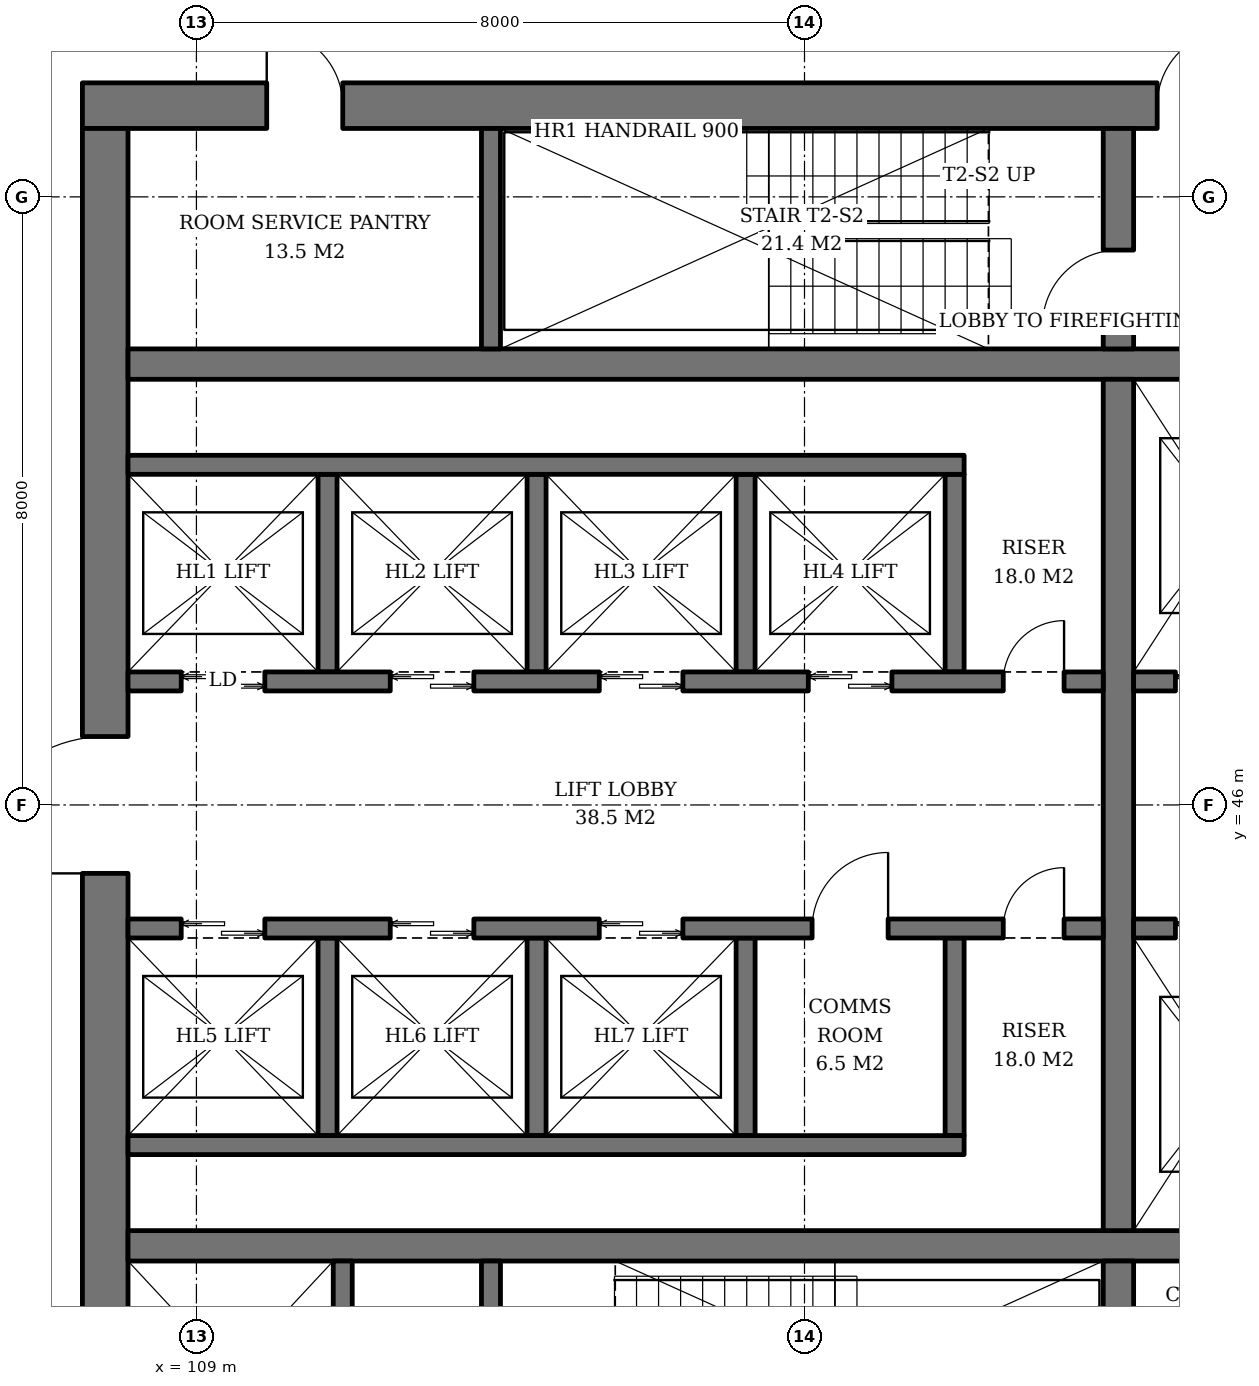
"""IFC4 building model, lengths in metres.
Left out: names, types, materials, properties, quantities, classifications, styles, units other than length and angle.
Written with IfcOpenShell. Run it as: python <this file> out.ifc"""

import sys

from ifc_helpers import new_model, si_unit, direction, frame, frame_2d, origin, place, context, subcontext, project, spatial, rectangle, extrude, element, fill, save


model = new_model("IFC4")
c1 = context("Model", 3, precision=1e-05, world=origin(), true_north=direction((0.0, 1.0)))
c2 = subcontext(c1, "Body", "Model", "MODEL_VIEW")
j1 = project(units=[si_unit("LENGTHUNIT", "METRE"), si_unit("PLANEANGLEUNIT", "RADIAN")], contexts=[c1])
p1 = place(None, origin())
s1 = spatial("IfcSite", under=j1, at=p1, CompositionType="ELEMENT")
p2 = place(p1, origin())
s2 = spatial("IfcBuilding", under=s1, at=p2, CompositionType="ELEMENT")
p3 = place(p2, frame((0.0, 0.0, 112.2)))
s3 = spatial("IfcBuildingStorey", under=s2, at=p3, CompositionType="ELEMENT", Elevation=112.2)
p4 = place(p3, frame((107.5, 55.2, 0.0), z_axis=(0.0, 0.0, 1.0), x_axis=(1.0, 0.0, 0.0)))
e1 = element("IfcWall", 1, at=p4, inside=s3, PredefinedType="SHEAR", context=c2, shape_type="SweptSolid", body=[
    extrude(rectangle(XDim=19.0, YDim=0.6, at=frame_2d((9.5, 0.0))), origin(), (0.0, 0.0, 1.0), 3.8),
])
p5 = place(p4, frame((14.14, 0.0, 0.0)))
e2 = element("IfcOpeningElement", 2, at=p5, cuts=e1, PredefinedType="OPENING", context=c2, shape_type="SweptSolid", body=[
    extrude(rectangle(XDim=1.0, YDim=2.1, at=frame_2d((0.5, 1.05))), frame((0.0, 0.31, 0.0), z_axis=(0.0, -1.0, 0.0), x_axis=(1.0, 0.0, 0.0)), (0.0, 0.0, 1.0), 0.62),
])
p6 = place(p4, frame((2.425, 0.0, 0.0)))
e3 = element("IfcOpeningElement", 3, at=p6, cuts=e1, PredefinedType="OPENING", context=c2, shape_type="SweptSolid", body=[
    extrude(rectangle(XDim=1.0, YDim=2.1, at=frame_2d((0.5, 1.05))), frame((0.0, 0.31, 0.0), z_axis=(0.0, -1.0, 0.0), x_axis=(1.0, 0.0, 0.0)), (0.0, 0.0, 1.0), 0.62),
])
p7 = place(p3, frame((107.8, 37.1, 0.0), z_axis=(0.0, 0.0, 1.0), x_axis=(0.0, 1.0, 0.0)))
e4 = element("IfcWall", 4, at=p7, inside=s3, PredefinedType="SHEAR", context=c2, shape_type="SweptSolid", body=[
    extrude(rectangle(XDim=17.8, YDim=0.6, at=frame_2d((8.9, 0.0))), origin(), (0.0, 0.0, 1.0), 3.8),
])
p8 = place(p7, frame((8.0, 0.0, 0.0)))
e5 = element("IfcOpeningElement", 5, at=p8, cuts=e4, PredefinedType="OPENING", context=c2, shape_type="SweptSolid", body=[
    extrude(rectangle(XDim=1.8, YDim=2.4, at=frame_2d((0.9, 1.2))), frame((0.0, 0.31, 0.0), z_axis=(0.0, -1.0, 0.0), x_axis=(1.0, 0.0, 0.0)), (0.0, 0.0, 1.0), 0.62),
])
for number, where, z_axis, x_axis in (
    (6, (108.1, 40.2, 0.0), (0.0, 0.0, 1.0), (1.0, 0.0, 0.0)),
    (7, (108.1, 51.8, 0.0), (0.0, 0.0, 1.0), (1.0, 0.0, 0.0)),
):
    element("IfcWall", number, at=place(p3, frame(where, z_axis=z_axis, x_axis=x_axis)), inside=s3, PredefinedType="SHEAR", context=c2, shape_type="SweptSolid", body=[
        extrude(rectangle(XDim=17.8, YDim=0.4, at=frame_2d((8.9, 0.0))), origin(), (0.0, 0.0, 1.0), 3.8),
    ])
p9 = place(p3, frame((121.13, 37.1, 0.0), z_axis=(0.0, 0.0, 1.0), x_axis=(0.0, 1.0, 0.0)))
e8 = element("IfcWall", 8, at=p9, inside=s3, PredefinedType="SHEAR", context=c2, shape_type="SweptSolid", body=[
    extrude(rectangle(XDim=2.9, YDim=0.4, at=frame_2d((1.45, 0.0))), origin(), (0.0, 0.0, 1.0), 3.8),
])
p10 = place(p3, frame((121.13, 40.4, 0.0), z_axis=(0.0, 0.0, 1.0), x_axis=(0.0, 1.0, 0.0)))
e9 = element("IfcWall", 9, at=p10, inside=s3, PredefinedType="SHEAR", context=c2, shape_type="SweptSolid", body=[
    extrude(rectangle(XDim=11.2, YDim=0.4, at=frame_2d((5.6, 0.0))), origin(), (0.0, 0.0, 1.0), 3.8),
])
p11 = place(p3, frame((121.13, 52.0, 0.0), z_axis=(0.0, 0.0, 1.0), x_axis=(0.0, 1.0, 0.0)))
e10 = element("IfcWall", 10, at=p11, inside=s3, PredefinedType="SHEAR", context=c2, shape_type="SweptSolid", body=[
    extrude(rectangle(XDim=2.9, YDim=0.4, at=frame_2d((1.45, 0.0))), origin(), (0.0, 0.0, 1.0), 3.8),
])
p12 = place(p11, frame((0.3, 0.0, 0.0)))
e11 = element("IfcOpeningElement", 11, at=p12, cuts=e10, PredefinedType="OPENING", context=c2, shape_type="SweptSolid", body=[
    extrude(rectangle(XDim=1.0, YDim=2.1, at=frame_2d((0.5, 1.05))), frame((0.0, 0.21, 0.0), z_axis=(0.0, -1.0, 0.0), x_axis=(1.0, 0.0, 0.0)), (0.0, 0.0, 1.0), 0.42),
])
p13 = place(p3, frame((110.925, 37.1, 0.0), z_axis=(0.0, 0.0, 1.0), x_axis=(0.0, 1.0, 0.0)))
e12 = element("IfcWall", 12, at=p13, inside=s3, PredefinedType="SHEAR", context=c2, shape_type="SweptSolid", body=[
    extrude(rectangle(XDim=2.9, YDim=0.25, at=frame_2d((1.45, 0.0))), origin(), (0.0, 0.0, 1.0), 3.8),
])
p14 = place(p13, frame((0.8, 0.0, 0.0)))
e13 = element("IfcOpeningElement", 13, at=p14, cuts=e12, PredefinedType="OPENING", context=c2, shape_type="SweptSolid", body=[
    extrude(rectangle(XDim=1.3, YDim=2.2, at=frame_2d((0.65, 1.1))), frame((0.0, 0.135, 0.0), z_axis=(0.0, -1.0, 0.0), x_axis=(1.0, 0.0, 0.0)), (0.0, 0.0, 1.0), 0.27),
])
p15 = place(p3, frame((112.875, 37.1, 0.0), z_axis=(0.0, 0.0, 1.0), x_axis=(0.0, 1.0, 0.0)))
e14 = element("IfcWall", 14, at=p15, inside=s3, PredefinedType="SHEAR", context=c2, shape_type="SweptSolid", body=[
    extrude(rectangle(XDim=2.9, YDim=0.25, at=frame_2d((1.45, 0.0))), origin(), (0.0, 0.0, 1.0), 3.8),
])
p16 = place(p15, frame((0.75, 0.0, 0.0)))
e15 = element("IfcOpeningElement", 15, at=p16, cuts=e14, PredefinedType="OPENING", context=c2, shape_type="SweptSolid", body=[
    extrude(rectangle(XDim=1.2, YDim=2.1, at=frame_2d((0.6, 1.05))), frame((0.0, 0.135, 0.0), z_axis=(0.0, -1.0, 0.0), x_axis=(1.0, 0.0, 0.0)), (0.0, 0.0, 1.0), 0.27),
])
p17 = place(p3, frame((112.875, 52.0, 0.0), z_axis=(0.0, 0.0, 1.0), x_axis=(0.0, 1.0, 0.0)))
e16 = element("IfcWall", 16, at=p17, inside=s3, PredefinedType="SHEAR", context=c2, shape_type="SweptSolid", body=[
    extrude(rectangle(XDim=2.9, YDim=0.25, at=frame_2d((1.45, 0.0))), origin(), (0.0, 0.0, 1.0), 3.8),
])
for number, where, z_axis, x_axis in (
    (17, (110.725, 47.75, 0.0), (0.0, 0.0, 1.0), (0.0, 1.0, 0.0)),
    (18, (113.475, 47.75, 0.0), (0.0, 0.0, 1.0), (0.0, 1.0, 0.0)),
    (19, (116.225, 47.75, 0.0), (0.0, 0.0, 1.0), (0.0, 1.0, 0.0)),
    (20, (118.975, 47.75, 0.0), (0.0, 0.0, 1.0), (0.0, 1.0, 0.0)),
):
    element("IfcWall", number, at=place(p3, frame(where, z_axis=z_axis, x_axis=x_axis)), inside=s3, PredefinedType="SHEAR", context=c2, shape_type="SweptSolid", body=[
        extrude(rectangle(XDim=2.6, YDim=0.25, at=frame_2d((1.3, 0.0))), origin(), (0.0, 0.0, 1.0), 3.8),
    ])
p18 = place(p3, frame((108.1, 50.475, 0.0), z_axis=(0.0, 0.0, 1.0), x_axis=(1.0, 0.0, 0.0)))
e21 = element("IfcWall", 21, at=p18, inside=s3, PredefinedType="SHEAR", context=c2, shape_type="SweptSolid", body=[
    extrude(rectangle(XDim=11.0, YDim=0.25, at=frame_2d((5.5, 0.0))), origin(), (0.0, 0.0, 1.0), 3.8),
])
p19 = place(p3, frame((108.1, 47.625, 0.0), z_axis=(0.0, 0.0, 1.0), x_axis=(1.0, 0.0, 0.0)))
e22 = element("IfcWall", 22, at=p19, inside=s3, PredefinedType="SHEAR", context=c2, shape_type="SweptSolid", body=[
    extrude(rectangle(XDim=12.83, YDim=0.25, at=frame_2d((6.415, 0.0))), origin(), (0.0, 0.0, 1.0), 3.8),
])
p20 = place(p19, frame((0.7, 0.0, 0.0)))
e23 = element("IfcOpeningElement", 23, at=p20, cuts=e22, PredefinedType="OPENING", context=c2, shape_type="SweptSolid", body=[
    extrude(rectangle(XDim=1.1, YDim=2.2, at=frame_2d((0.55, 1.1))), frame((0.0, 0.135, 0.0), z_axis=(0.0, -1.0, 0.0), x_axis=(1.0, 0.0, 0.0)), (0.0, 0.0, 1.0), 0.27),
])
p21 = place(p19, frame((3.45, 0.0, 0.0)))
e24 = element("IfcOpeningElement", 24, at=p21, cuts=e22, PredefinedType="OPENING", context=c2, shape_type="SweptSolid", body=[
    extrude(rectangle(XDim=1.1, YDim=2.2, at=frame_2d((0.55, 1.1))), frame((0.0, 0.135, 0.0), z_axis=(0.0, -1.0, 0.0), x_axis=(1.0, 0.0, 0.0)), (0.0, 0.0, 1.0), 0.27),
])
p22 = place(p19, frame((6.2, 0.0, 0.0)))
e25 = element("IfcOpeningElement", 25, at=p22, cuts=e22, PredefinedType="OPENING", context=c2, shape_type="SweptSolid", body=[
    extrude(rectangle(XDim=1.1, YDim=2.2, at=frame_2d((0.55, 1.1))), frame((0.0, 0.135, 0.0), z_axis=(0.0, -1.0, 0.0), x_axis=(1.0, 0.0, 0.0)), (0.0, 0.0, 1.0), 0.27),
])
p23 = place(p19, frame((8.95, 0.0, 0.0)))
e26 = element("IfcOpeningElement", 26, at=p23, cuts=e22, PredefinedType="OPENING", context=c2, shape_type="SweptSolid", body=[
    extrude(rectangle(XDim=1.1, YDim=2.2, at=frame_2d((0.55, 1.1))), frame((0.0, 0.135, 0.0), z_axis=(0.0, -1.0, 0.0), x_axis=(1.0, 0.0, 0.0)), (0.0, 0.0, 1.0), 0.27),
])
p24 = place(p19, frame((11.515, 0.0, 0.0)))
e27 = element("IfcOpeningElement", 27, at=p24, cuts=e22, PredefinedType="OPENING", context=c2, shape_type="SweptSolid", body=[
    extrude(rectangle(XDim=0.8, YDim=2.0, at=frame_2d((0.4, 1.0))), frame((0.0, 0.135, 0.0), z_axis=(0.0, -1.0, 0.0), x_axis=(1.0, 0.0, 0.0)), (0.0, 0.0, 1.0), 0.27),
])
for number, where, z_axis, x_axis in (
    (28, (110.725, 44.25, 0.0), (0.0, 0.0, 1.0), (0.0, -1.0, 0.0)),
    (29, (113.475, 44.25, 0.0), (0.0, 0.0, 1.0), (0.0, -1.0, 0.0)),
    (30, (116.225, 44.25, 0.0), (0.0, 0.0, 1.0), (0.0, -1.0, 0.0)),
    (31, (118.975, 44.25, 0.0), (0.0, 0.0, 1.0), (0.0, -1.0, 0.0)),
):
    element("IfcWall", number, at=place(p3, frame(where, z_axis=z_axis, x_axis=x_axis)), inside=s3, PredefinedType="SHEAR", context=c2, shape_type="SweptSolid", body=[
        extrude(rectangle(XDim=2.6, YDim=0.25, at=frame_2d((1.3, 0.0))), origin(), (0.0, 0.0, 1.0), 3.8),
    ])
p25 = place(p3, frame((108.1, 41.525, 0.0), z_axis=(0.0, 0.0, 1.0), x_axis=(1.0, 0.0, 0.0)))
e32 = element("IfcWall", 32, at=p25, inside=s3, PredefinedType="SHEAR", context=c2, shape_type="SweptSolid", body=[
    extrude(rectangle(XDim=11.0, YDim=0.25, at=frame_2d((5.5, 0.0))), origin(), (0.0, 0.0, 1.0), 3.8),
])
p26 = place(p3, frame((108.1, 44.375, 0.0), z_axis=(0.0, 0.0, 1.0), x_axis=(1.0, 0.0, 0.0)))
e33 = element("IfcWall", 33, at=p26, inside=s3, PredefinedType="SHEAR", context=c2, shape_type="SweptSolid", body=[
    extrude(rectangle(XDim=12.83, YDim=0.25, at=frame_2d((6.415, 0.0))), origin(), (0.0, 0.0, 1.0), 3.8),
])
p27 = place(p26, frame((0.7, 0.0, 0.0)))
e34 = element("IfcOpeningElement", 34, at=p27, cuts=e33, PredefinedType="OPENING", context=c2, shape_type="SweptSolid", body=[
    extrude(rectangle(XDim=1.1, YDim=2.2, at=frame_2d((0.55, 1.1))), frame((0.0, 0.135, 0.0), z_axis=(0.0, -1.0, 0.0), x_axis=(1.0, 0.0, 0.0)), (0.0, 0.0, 1.0), 0.27),
])
p28 = place(p26, frame((3.45, 0.0, 0.0)))
e35 = element("IfcOpeningElement", 35, at=p28, cuts=e33, PredefinedType="OPENING", context=c2, shape_type="SweptSolid", body=[
    extrude(rectangle(XDim=1.1, YDim=2.2, at=frame_2d((0.55, 1.1))), frame((0.0, 0.135, 0.0), z_axis=(0.0, -1.0, 0.0), x_axis=(1.0, 0.0, 0.0)), (0.0, 0.0, 1.0), 0.27),
])
p29 = place(p26, frame((6.2, 0.0, 0.0)))
e36 = element("IfcOpeningElement", 36, at=p29, cuts=e33, PredefinedType="OPENING", context=c2, shape_type="SweptSolid", body=[
    extrude(rectangle(XDim=1.1, YDim=2.2, at=frame_2d((0.55, 1.1))), frame((0.0, 0.135, 0.0), z_axis=(0.0, -1.0, 0.0), x_axis=(1.0, 0.0, 0.0)), (0.0, 0.0, 1.0), 0.27),
])
p30 = place(p26, frame((9.0, 0.0, 0.0)))
e37 = element("IfcOpeningElement", 37, at=p30, cuts=e33, PredefinedType="OPENING", context=c2, shape_type="SweptSolid", body=[
    extrude(rectangle(XDim=1.0, YDim=2.1, at=frame_2d((0.5, 1.05))), frame((0.0, 0.135, 0.0), z_axis=(0.0, -1.0, 0.0), x_axis=(1.0, 0.0, 0.0)), (0.0, 0.0, 1.0), 0.27),
])
p31 = place(p26, frame((11.515, 0.0, 0.0)))
e38 = element("IfcOpeningElement", 38, at=p31, cuts=e33, PredefinedType="OPENING", context=c2, shape_type="SweptSolid", body=[
    extrude(rectangle(XDim=0.8, YDim=2.0, at=frame_2d((0.4, 1.0))), frame((0.0, 0.135, 0.0), z_axis=(0.0, -1.0, 0.0), x_axis=(1.0, 0.0, 0.0)), (0.0, 0.0, 1.0), 0.27),
])
p32 = place(p3, frame((121.33, 47.625, 0.0), z_axis=(0.0, 0.0, 1.0), x_axis=(1.0, 0.0, 0.0)))
e39 = element("IfcWall", 39, at=p32, inside=s3, PredefinedType="SHEAR", context=c2, shape_type="SweptSolid", body=[
    extrude(rectangle(XDim=4.57, YDim=0.25, at=frame_2d((2.285, 0.0))), origin(), (0.0, 0.0, 1.0), 3.8),
])
p33 = place(p32, frame((0.55, 0.0, 0.0)))
e40 = element("IfcOpeningElement", 40, at=p33, cuts=e39, PredefinedType="OPENING", context=c2, shape_type="SweptSolid", body=[
    extrude(rectangle(XDim=1.4, YDim=2.4, at=frame_2d((0.7, 1.2))), frame((0.0, 0.135, 0.0), z_axis=(0.0, -1.0, 0.0), x_axis=(1.0, 0.0, 0.0)), (0.0, 0.0, 1.0), 0.27),
])
p34 = place(p32, frame((3.26, 0.0, 0.0)))
e41 = element("IfcOpeningElement", 41, at=p34, cuts=e39, PredefinedType="OPENING", context=c2, shape_type="SweptSolid", body=[
    extrude(rectangle(XDim=0.8, YDim=2.0, at=frame_2d((0.4, 1.0))), frame((0.0, 0.135, 0.0), z_axis=(0.0, -1.0, 0.0), x_axis=(1.0, 0.0, 0.0)), (0.0, 0.0, 1.0), 0.27),
])
p35 = place(p3, frame((121.33, 44.375, 0.0), z_axis=(0.0, 0.0, 1.0), x_axis=(1.0, 0.0, 0.0)))
e42 = element("IfcWall", 42, at=p35, inside=s3, PredefinedType="SHEAR", context=c2, shape_type="SweptSolid", body=[
    extrude(rectangle(XDim=4.57, YDim=0.25, at=frame_2d((2.285, 0.0))), origin(), (0.0, 0.0, 1.0), 3.8),
])
p36 = place(p35, frame((0.55, 0.0, 0.0)))
e43 = element("IfcOpeningElement", 43, at=p36, cuts=e42, PredefinedType="OPENING", context=c2, shape_type="SweptSolid", body=[
    extrude(rectangle(XDim=1.4, YDim=2.4, at=frame_2d((0.7, 1.2))), frame((0.0, 0.135, 0.0), z_axis=(0.0, -1.0, 0.0), x_axis=(1.0, 0.0, 0.0)), (0.0, 0.0, 1.0), 0.27),
])
p37 = place(p35, frame((3.26, 0.0, 0.0)))
e44 = element("IfcOpeningElement", 44, at=p37, cuts=e42, PredefinedType="OPENING", context=c2, shape_type="SweptSolid", body=[
    extrude(rectangle(XDim=0.8, YDim=2.0, at=frame_2d((0.4, 1.0))), frame((0.0, 0.135, 0.0), z_axis=(0.0, -1.0, 0.0), x_axis=(1.0, 0.0, 0.0)), (0.0, 0.0, 1.0), 0.27),
])
p38 = place(p20, origin())
e45 = element("IfcDoor", 45, at=p38, inside=s3, OperationType="DOUBLE_DOOR_SLIDING", PredefinedType="DOOR", context=c2, shape_type="SweptSolid", body=[
    extrude(rectangle(XDim=1.1, YDim=2.2, at=frame_2d((0.55, 1.1))), frame((0.0, 0.025, 0.0), z_axis=(0.0, -1.0, 0.0), x_axis=(1.0, 0.0, 0.0)), (0.0, 0.0, 1.0), 0.05),
])
fill(e23, e45)
p39 = place(p21, origin())
e46 = element("IfcDoor", 46, at=p39, inside=s3, OperationType="DOUBLE_DOOR_SLIDING", PredefinedType="DOOR", context=c2, shape_type="SweptSolid", body=[
    extrude(rectangle(XDim=1.1, YDim=2.2, at=frame_2d((0.55, 1.1))), frame((0.0, 0.025, 0.0), z_axis=(0.0, -1.0, 0.0), x_axis=(1.0, 0.0, 0.0)), (0.0, 0.0, 1.0), 0.05),
])
fill(e24, e46)
p40 = place(p22, origin())
e47 = element("IfcDoor", 47, at=p40, inside=s3, OperationType="DOUBLE_DOOR_SLIDING", PredefinedType="DOOR", context=c2, shape_type="SweptSolid", body=[
    extrude(rectangle(XDim=1.1, YDim=2.2, at=frame_2d((0.55, 1.1))), frame((0.0, 0.025, 0.0), z_axis=(0.0, -1.0, 0.0), x_axis=(1.0, 0.0, 0.0)), (0.0, 0.0, 1.0), 0.05),
])
fill(e25, e47)
p41 = place(p23, origin())
e48 = element("IfcDoor", 48, at=p41, inside=s3, OperationType="DOUBLE_DOOR_SLIDING", PredefinedType="DOOR", context=c2, shape_type="SweptSolid", body=[
    extrude(rectangle(XDim=1.1, YDim=2.2, at=frame_2d((0.55, 1.1))), frame((0.0, 0.025, 0.0), z_axis=(0.0, -1.0, 0.0), x_axis=(1.0, 0.0, 0.0)), (0.0, 0.0, 1.0), 0.05),
])
fill(e26, e48)
p42 = place(p24, origin())
e49 = element("IfcDoor", 49, at=p42, inside=s3, OperationType="SINGLE_SWING_RIGHT", PredefinedType="DOOR", context=c2, shape_type="SweptSolid", body=[
    extrude(rectangle(XDim=0.8, YDim=2.0, at=frame_2d((0.4, 1.0))), frame((0.0, 0.025, 0.0), z_axis=(0.0, -1.0, 0.0), x_axis=(1.0, 0.0, 0.0)), (0.0, 0.0, 1.0), 0.05),
])
fill(e27, e49)
p43 = place(p27, origin())
e50 = element("IfcDoor", 50, at=p43, inside=s3, OperationType="DOUBLE_DOOR_SLIDING", PredefinedType="DOOR", context=c2, shape_type="SweptSolid", body=[
    extrude(rectangle(XDim=1.1, YDim=2.2, at=frame_2d((0.55, 1.1))), frame((0.0, 0.025, 0.0), z_axis=(0.0, -1.0, 0.0), x_axis=(1.0, 0.0, 0.0)), (0.0, 0.0, 1.0), 0.05),
])
fill(e34, e50)
p44 = place(p28, origin())
e51 = element("IfcDoor", 51, at=p44, inside=s3, OperationType="DOUBLE_DOOR_SLIDING", PredefinedType="DOOR", context=c2, shape_type="SweptSolid", body=[
    extrude(rectangle(XDim=1.1, YDim=2.2, at=frame_2d((0.55, 1.1))), frame((0.0, 0.025, 0.0), z_axis=(0.0, -1.0, 0.0), x_axis=(1.0, 0.0, 0.0)), (0.0, 0.0, 1.0), 0.05),
])
fill(e35, e51)
p45 = place(p29, origin())
e52 = element("IfcDoor", 52, at=p45, inside=s3, OperationType="DOUBLE_DOOR_SLIDING", PredefinedType="DOOR", context=c2, shape_type="SweptSolid", body=[
    extrude(rectangle(XDim=1.1, YDim=2.2, at=frame_2d((0.55, 1.1))), frame((0.0, 0.025, 0.0), z_axis=(0.0, -1.0, 0.0), x_axis=(1.0, 0.0, 0.0)), (0.0, 0.0, 1.0), 0.05),
])
fill(e36, e52)
p46 = place(p30, origin())
e53 = element("IfcDoor", 53, at=p46, inside=s3, OperationType="SINGLE_SWING_RIGHT", PredefinedType="DOOR", context=c2, shape_type="SweptSolid", body=[
    extrude(rectangle(XDim=1.0, YDim=2.1, at=frame_2d((0.5, 1.05))), frame((0.0, 0.025, 0.0), z_axis=(0.0, -1.0, 0.0), x_axis=(1.0, 0.0, 0.0)), (0.0, 0.0, 1.0), 0.05),
])
fill(e37, e53)
p47 = place(p31, origin())
e54 = element("IfcDoor", 54, at=p47, inside=s3, OperationType="SINGLE_SWING_RIGHT", PredefinedType="DOOR", context=c2, shape_type="SweptSolid", body=[
    extrude(rectangle(XDim=0.8, YDim=2.0, at=frame_2d((0.4, 1.0))), frame((0.0, 0.025, 0.0), z_axis=(0.0, -1.0, 0.0), x_axis=(1.0, 0.0, 0.0)), (0.0, 0.0, 1.0), 0.05),
])
fill(e38, e54)
p48 = place(p33, origin())
e55 = element("IfcDoor", 55, at=p48, inside=s3, OperationType="DOUBLE_DOOR_SLIDING", PredefinedType="DOOR", context=c2, shape_type="SweptSolid", body=[
    extrude(rectangle(XDim=1.4, YDim=2.4, at=frame_2d((0.7, 1.2))), frame((0.0, 0.025, 0.0), z_axis=(0.0, -1.0, 0.0), x_axis=(1.0, 0.0, 0.0)), (0.0, 0.0, 1.0), 0.05),
])
fill(e40, e55)
p49 = place(p36, origin())
e56 = element("IfcDoor", 56, at=p49, inside=s3, OperationType="DOUBLE_DOOR_SLIDING", PredefinedType="DOOR", context=c2, shape_type="SweptSolid", body=[
    extrude(rectangle(XDim=1.4, YDim=2.4, at=frame_2d((0.7, 1.2))), frame((0.0, 0.025, 0.0), z_axis=(0.0, -1.0, 0.0), x_axis=(1.0, 0.0, 0.0)), (0.0, 0.0, 1.0), 0.05),
])
fill(e43, e56)
p50 = place(p12, origin())
e57 = element("IfcDoor", 57, at=p50, inside=s3, OperationType="SINGLE_SWING_LEFT", PredefinedType="DOOR", context=c2, shape_type="SweptSolid", body=[
    extrude(rectangle(XDim=1.0, YDim=2.1, at=frame_2d((0.5, 1.05))), frame((0.0, 0.025, 0.0), z_axis=(0.0, -1.0, 0.0), x_axis=(1.0, 0.0, 0.0)), (0.0, 0.0, 1.0), 0.05),
])
fill(e11, e57)
p51 = place(p5, origin())
e58 = element("IfcDoor", 58, at=p51, inside=s3, OperationType="SINGLE_SWING_RIGHT", PredefinedType="DOOR", context=c2, shape_type="SweptSolid", body=[
    extrude(rectangle(XDim=1.0, YDim=2.1, at=frame_2d((0.5, 1.05))), frame((0.0, 0.025, 0.0), z_axis=(0.0, -1.0, 0.0), x_axis=(1.0, 0.0, 0.0)), (0.0, 0.0, 1.0), 0.05),
])
fill(e2, e58)
p52 = place(p8, origin())
e59 = element("IfcDoor", 59, at=p52, inside=s3, OperationType="DOUBLE_DOOR_SINGLE_SWING", PredefinedType="DOOR", context=c2, shape_type="SweptSolid", body=[
    extrude(rectangle(XDim=1.8, YDim=2.4, at=frame_2d((0.9, 1.2))), frame((0.0, 0.025, 0.0), z_axis=(0.0, -1.0, 0.0), x_axis=(1.0, 0.0, 0.0)), (0.0, 0.0, 1.0), 0.05),
])
fill(e5, e59)
p53 = place(p6, origin())
e60 = element("IfcDoor", 60, at=p53, inside=s3, OperationType="SINGLE_SWING_LEFT", PredefinedType="DOOR", context=c2, shape_type="SweptSolid", body=[
    extrude(rectangle(XDim=1.0, YDim=2.1, at=frame_2d((0.5, 1.05))), frame((0.0, -0.24, 0.0), z_axis=(0.0, -1.0, 0.0), x_axis=(1.0, 0.0, 0.0)), (0.0, 0.0, 1.0), 0.05),
])
fill(e3, e60)
save(model, sys.argv[1])
